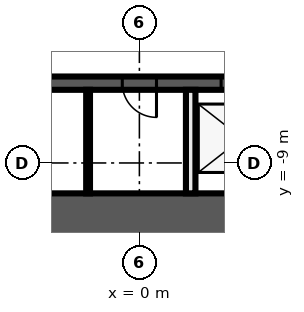
"""IFC4 building model, lengths in metres.
Left out: names, types, materials, properties, quantities, classifications, styles, units other than length and angle.
Written with IfcOpenShell. Run it as: python <this file> out.ifc"""

import sys

from ifc_helpers import new_model, si_unit, direction, frame, frame_2d, origin, place, context, subcontext, project, spatial, rectangle, extrude, element, fill, save


model = new_model("IFC4")
c1 = context("Model", 3, precision=1e-05, world=origin(), true_north=direction((0.0, 1.0)))
c2 = subcontext(c1, "Body", "Model", "MODEL_VIEW")
j1 = project(units=[si_unit("LENGTHUNIT", "METRE"), si_unit("PLANEANGLEUNIT", "RADIAN")], contexts=[c1])
p1 = place(None, origin())
s1 = spatial("IfcSite", under=j1, at=p1, CompositionType="ELEMENT")
p2 = place(p1, origin())
s2 = spatial("IfcBuilding", under=s1, at=p2, CompositionType="ELEMENT")
p3 = place(p2, origin())
s3 = spatial("IfcBuildingStorey", under=s2, at=p3, CompositionType="ELEMENT", Elevation=0.0)
p4 = place(p3, frame((14.0, -10.4, 0.0), z_axis=(0.0, 0.0, 1.0), x_axis=(-1.0, 0.0, 0.0)))
e1 = element("IfcWall", 1, at=p4, inside=s3, PredefinedType="SHEAR", context=c2, shape_type="SweptSolid", body=[
    extrude(rectangle(XDim=28.0, YDim=1.2, at=frame_2d((14.0, 0.0))), origin(), (0.0, 0.0, 1.0), 8.55),
])
p5 = place(p4, frame((5.1, 0.0, 0.0)))
e2 = element("IfcOpeningElement", 2, at=p5, cuts=e1, PredefinedType="OPENING", context=c2, shape_type="SweptSolid", body=[
    extrude(rectangle(XDim=1.6, YDim=2.1, at=frame_2d((0.8, 1.05))), frame((0.0, 0.61, 0.0), z_axis=(0.0, -1.0, 0.0), x_axis=(1.0, 0.0, 0.0)), (0.0, 0.0, 1.0), 1.22),
])
p6 = place(p3, frame((9.45, -6.9, 0.0), z_axis=(0.0, 0.0, 1.0), x_axis=(-1.0, 0.0, 0.0)))
e3 = element("IfcWall", 3, at=p6, inside=s3, PredefinedType="SHEAR", context=c2, shape_type="SweptSolid", body=[
    extrude(rectangle(XDim=18.9, YDim=0.35, at=frame_2d((9.45, 0.0))), origin(), (0.0, 0.0, 1.0), 8.55),
])
p7 = place(p6, frame((6.2, 0.0, 0.0)))
e4 = element("IfcOpeningElement", 4, at=p7, cuts=e3, PredefinedType="OPENING", context=c2, shape_type="SweptSolid", body=[
    extrude(rectangle(XDim=1.1, YDim=2.1, at=frame_2d((0.55, 1.05))), frame((0.0, 0.185, 0.0), z_axis=(0.0, -1.0, 0.0), x_axis=(1.0, 0.0, 0.0)), (0.0, 0.0, 1.0), 0.37),
])
p8 = place(p6, frame((3.5, 0.0, 0.0)))
e5 = element("IfcOpeningElement", 5, at=p8, cuts=e3, PredefinedType="OPENING", context=c2, shape_type="SweptSolid", body=[
    extrude(rectangle(XDim=1.1, YDim=2.1, at=frame_2d((0.55, 1.05))), frame((0.0, 0.185, 0.0), z_axis=(0.0, -1.0, 0.0), x_axis=(1.0, 0.0, 0.0)), (0.0, 0.0, 1.0), 0.37),
])
p9 = place(p6, frame((0.75, 0.0, 0.0)))
e6 = element("IfcOpeningElement", 6, at=p9, cuts=e3, PredefinedType="OPENING", context=c2, shape_type="SweptSolid", body=[
    extrude(rectangle(XDim=1.2, YDim=2.1, at=frame_2d((0.6, 1.05))), frame((0.0, 0.185, 0.0), z_axis=(0.0, -1.0, 0.0), x_axis=(1.0, 0.0, 0.0)), (0.0, 0.0, 1.0), 0.37),
])
p10 = place(p6, frame((17.1, 0.0, 0.0)))
e7 = element("IfcOpeningElement", 7, at=p10, cuts=e3, PredefinedType="OPENING", context=c2, shape_type="SweptSolid", body=[
    extrude(rectangle(XDim=0.9, YDim=2.1, at=frame_2d((0.45, 1.05))), frame((0.0, 0.185, 0.0), z_axis=(0.0, -1.0, 0.0), x_axis=(1.0, 0.0, 0.0)), (0.0, 0.0, 1.0), 0.37),
])
p11 = place(p6, frame((13.05, 0.0, 0.0)))
e8 = element("IfcOpeningElement", 8, at=p11, cuts=e3, PredefinedType="OPENING", context=c2, shape_type="SweptSolid", body=[
    extrude(rectangle(XDim=0.9, YDim=2.1, at=frame_2d((0.45, 1.05))), frame((0.0, 0.185, 0.0), z_axis=(0.0, -1.0, 0.0), x_axis=(1.0, 0.0, 0.0)), (0.0, 0.0, 1.0), 0.37),
])
p12 = place(p6, frame((9.0, 0.0, 0.0)))
e9 = element("IfcOpeningElement", 9, at=p12, cuts=e3, PredefinedType="OPENING", context=c2, shape_type="SweptSolid", body=[
    extrude(rectangle(XDim=0.9, YDim=2.1, at=frame_2d((0.45, 1.05))), frame((0.0, 0.185, 0.0), z_axis=(0.0, -1.0, 0.0), x_axis=(1.0, 0.0, 0.0)), (0.0, 0.0, 1.0), 0.37),
])
p13 = place(p3, frame((1.35, -9.8, 0.0), z_axis=(0.0, 0.0, 1.0), x_axis=(0.0, 1.0, 0.0)))
e10 = element("IfcWall", 10, at=p13, inside=s3, PredefinedType="SOLIDWALL", context=c2, shape_type="SweptSolid", body=[
    extrude(rectangle(XDim=2.725, YDim=0.25, at=frame_2d((1.363, 0.0))), origin(), (0.0, 0.0, 1.0), 8.55),
])
p14 = place(p3, frame((-1.35, -9.8, 0.0), z_axis=(0.0, 0.0, 1.0), x_axis=(0.0, 1.0, 0.0)))
e11 = element("IfcWall", 11, at=p14, inside=s3, PredefinedType="PARTITIONING", context=c2, shape_type="SweptSolid", body=[
    extrude(rectangle(XDim=2.725, YDim=0.1, at=frame_2d((1.363, 0.0))), origin(), (0.0, 0.0, 1.0), 8.55),
])
p15 = place(p7, origin())
e12 = element("IfcDoor", 12, at=p15, inside=s3, OperationType="DOUBLE_DOOR_SLIDING", PredefinedType="DOOR", context=c2, shape_type="SweptSolid", body=[
    extrude(rectangle(XDim=1.1, YDim=2.1, at=frame_2d((0.55, 1.05))), frame((0.0, 0.025, 0.0), z_axis=(0.0, -1.0, 0.0), x_axis=(1.0, 0.0, 0.0)), (0.0, 0.0, 1.0), 0.05),
])
fill(e4, e12)
p16 = place(p12, origin())
e13 = element("IfcDoor", 13, at=p16, inside=s3, OperationType="SINGLE_SWING_RIGHT", PredefinedType="DOOR", context=c2, shape_type="SweptSolid", body=[
    extrude(rectangle(XDim=0.9, YDim=2.1, at=frame_2d((0.45, 1.05))), frame((0.0, 0.025, 0.0), z_axis=(0.0, -1.0, 0.0), x_axis=(1.0, 0.0, 0.0)), (0.0, 0.0, 1.0), 0.05),
])
fill(e9, e13)
save(model, sys.argv[1])
